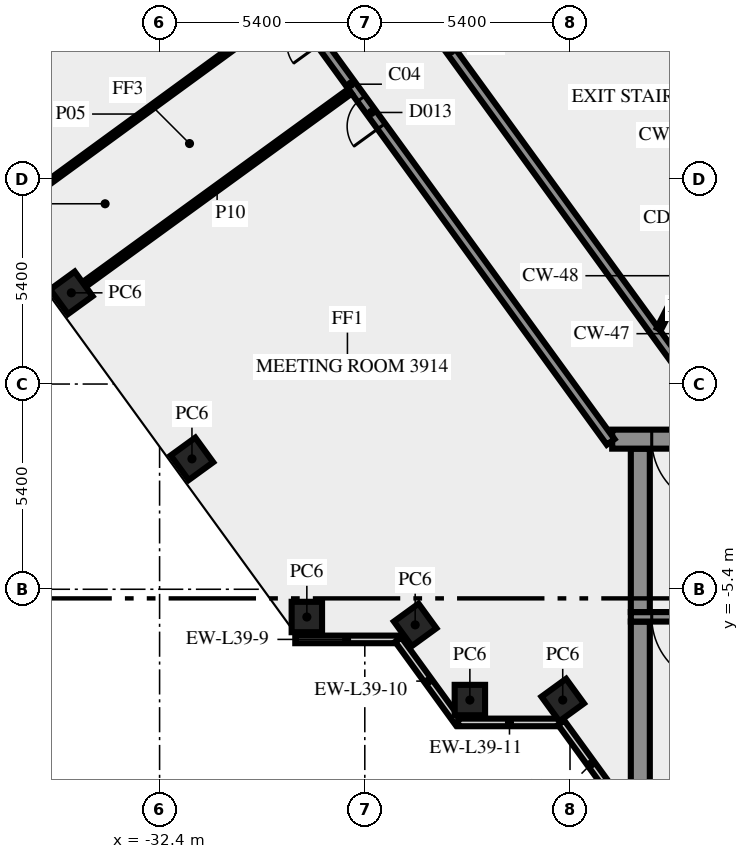
"""IFC4 building model, lengths in metres.
Left out: names, types, materials, properties, quantities, classifications, styles, units other than length and angle.
Written with IfcOpenShell. Run it as: python <this file> out.ifc"""

import sys

from ifc_helpers import new_model, si_unit, direction, frame, frame_2d, origin, origin_2d, place, context, subcontext, project, spatial, rectangle, extrude, element, fill, save


model = new_model("IFC4")
c1 = context("Model", 3, precision=1e-05, world=origin(), true_north=direction((0.0, 1.0)))
c2 = subcontext(c1, "Body", "Model", "MODEL_VIEW")
j1 = project(units=[si_unit("LENGTHUNIT", "METRE"), si_unit("PLANEANGLEUNIT", "RADIAN")], contexts=[c1])
p1 = place(None, origin())
s1 = spatial("IfcSite", under=j1, at=p1, CompositionType="ELEMENT")
p2 = place(p1, origin())
s2 = spatial("IfcBuilding", under=s1, at=p2, CompositionType="ELEMENT")
p3 = place(p2, frame((0.0, 0.0, 168.0)))
s3 = spatial("IfcBuildingStorey", under=s2, at=p3, CompositionType="ELEMENT", Elevation=168.0)
for number, where, z_axis, x_axis in (
    (1, (-34.722, 2.4, 0.0), (0.0, 0.0, 1.0), (0.588, -0.809, 0.0)),
    (2, (-31.548, -1.969, 0.0), (0.0, 0.0, 1.0), (0.588, -0.809, 0.0)),
    (3, (-28.525, -6.13, 0.0), (0.0, 0.0, 1.0), (1.0, 0.0, 0.0)),
    (4, (-25.674, -6.337, 0.0), (0.0, 0.0, 1.0), (0.588, -0.809, 0.0)),
    (5, (-24.235, -8.315, 0.0), (0.0, 0.0, 1.0), (1.0, 0.0, 0.0)),
    (6, (-21.792, -8.315, 0.0), (0.0, 0.0, 1.0), (0.588, -0.809, 0.0)),
):
    element("IfcColumn", number, at=place(p3, frame(where, z_axis=z_axis, x_axis=x_axis)), inside=s3, PredefinedType="COLUMN", context=c2, shape_type="SweptSolid", body=[
        extrude(rectangle(XDim=0.8, YDim=0.8, at=origin_2d()), origin(), (0.0, 0.0, 1.0), 3.65),
    ])
p4 = place(p3, frame((-28.83, -6.719, 0.0), z_axis=(0.0, 0.0, 1.0), x_axis=(1.0, 0.0, 0.0)))
e7 = element("IfcWall", 7, at=p4, inside=s3, PredefinedType="SOLIDWALL", context=c2, shape_type="SweptSolid", body=[
    extrude(rectangle(XDim=2.7, YDim=0.2, at=frame_2d((1.35, 0.0))), origin(), (0.0, 0.0, 1.0), 3.65),
])
p5 = place(p3, frame((-26.12, -6.724, 0.0), z_axis=(0.0, 0.0, 1.0), x_axis=(0.587720002413, -0.809064397168, 0.0)))
e8 = element("IfcWall", 8, at=p5, inside=s3, PredefinedType="SOLIDWALL", context=c2, shape_type="SweptSolid", body=[
    extrude(rectangle(XDim=2.7, YDim=0.2, at=frame_2d((1.35, 0.0))), origin(), (0.0, 0.0, 1.0), 3.65),
])
p6 = place(p3, frame((-24.543, -8.904, 0.0), z_axis=(0.0, 0.0, 1.0), x_axis=(1.0, 0.0, 0.0)))
e9 = element("IfcWall", 9, at=p6, inside=s3, PredefinedType="SOLIDWALL", context=c2, shape_type="SweptSolid", body=[
    extrude(rectangle(XDim=2.7, YDim=0.2, at=frame_2d((1.35, 0.0))), origin(), (0.0, 0.0, 1.0), 3.65),
])
p7 = place(p3, frame((-21.833, -8.909, 0.0), z_axis=(0.0, 0.0, 1.0), x_axis=(0.587766567315, -0.809030569476, 0.0)))
e10 = element("IfcWall", 10, at=p7, inside=s3, PredefinedType="SOLIDWALL", context=c2, shape_type="SweptSolid", body=[
    extrude(rectangle(XDim=2.688, YDim=0.2, at=frame_2d((1.344, 0.0))), origin(), (0.0, 0.0, 1.0), 3.65),
])
p8 = place(p3, frame((-19.75, -10.5, 0.0), z_axis=(0.0, 0.0, 1.0), x_axis=(0.0, 1.0, 0.0)))
e11 = element("IfcWall", 11, at=p8, inside=s3, PredefinedType="SHEAR", context=c2, shape_type="SweptSolid", body=[
    extrude(rectangle(XDim=4.25, YDim=0.5, at=frame_2d((2.125, 0.0))), origin(), (0.0, 0.0, 1.0), 3.65),
])
p9 = place(p3, frame((-9.8, -6.125, 0.0), z_axis=(0.0, 0.0, 1.0), x_axis=(-1.0, 0.0, 0.0)))
e12 = element("IfcWall", 12, at=p9, inside=s3, PredefinedType="SHEAR", context=c2, shape_type="SweptSolid", body=[
    extrude(rectangle(XDim=10.2, YDim=0.25, at=frame_2d((5.1, 0.0))), origin(), (0.0, 0.0, 1.0), 3.65),
])
p10 = place(p9, frame((7.85, 0.0, 0.0)))
e13 = element("IfcOpeningElement", 13, at=p10, cuts=e12, PredefinedType="OPENING", context=c2, shape_type="SweptSolid", body=[
    extrude(rectangle(XDim=1.8, YDim=2.1, at=frame_2d((0.9, 1.05))), frame((0.0, 0.135, 0.0), z_axis=(0.0, -1.0, 0.0), x_axis=(1.0, 0.0, 0.0)), (0.0, 0.0, 1.0), 0.27),
])
p11 = place(p3, frame((-19.75, -6.0, 0.0), z_axis=(0.0, 0.0, 1.0), x_axis=(0.0, 1.0, 0.0)))
e14 = element("IfcWall", 14, at=p11, inside=s3, PredefinedType="SHEAR", context=c2, shape_type="SweptSolid", body=[
    extrude(rectangle(XDim=4.3, YDim=0.5, at=frame_2d((2.15, 0.0))), origin(), (0.0, 0.0, 1.0), 3.65),
])
p12 = place(p3, frame((20.49, -1.45, 0.0), z_axis=(0.0, 0.0, 1.0), x_axis=(-1.0, 0.0, 0.0)))
e15 = element("IfcWall", 15, at=p12, inside=s3, PredefinedType="SHEAR", context=c2, shape_type="SweptSolid", body=[
    extrude(rectangle(XDim=40.98, YDim=0.5, at=frame_2d((20.49, 0.0))), origin(), (0.0, 0.0, 1.0), 3.65),
])
p13 = place(p12, frame((38.14, 0.0, 0.0)))
e16 = element("IfcOpeningElement", 16, at=p13, cuts=e15, PredefinedType="OPENING", context=c2, shape_type="SweptSolid", body=[
    extrude(rectangle(XDim=1.8, YDim=2.1, at=frame_2d((0.9, 1.05))), frame((0.0, 0.26, 0.0), z_axis=(0.0, -1.0, 0.0), x_axis=(1.0, 0.0, 0.0)), (0.0, 0.0, 1.0), 0.52),
])
p14 = place(p12, frame((36.728, 0.0, 0.0)))
e17 = element("IfcOpeningElement", 17, at=p14, cuts=e15, PredefinedType="OPENING", context=c2, shape_type="SweptSolid", body=[
    extrude(rectangle(XDim=0.8, YDim=2.1, at=frame_2d((0.4, 1.05))), frame((0.0, 0.26, 0.0), z_axis=(0.0, -1.0, 0.0), x_axis=(1.0, 0.0, 0.0)), (0.0, 0.0, 1.0), 0.52),
])
p15 = place(p12, frame((35.153, 0.0, 0.0)))
e18 = element("IfcOpeningElement", 18, at=p15, cuts=e15, PredefinedType="OPENING", context=c2, shape_type="SweptSolid", body=[
    extrude(rectangle(XDim=0.8, YDim=2.1, at=frame_2d((0.4, 1.05))), frame((0.0, 0.26, 0.0), z_axis=(0.0, -1.0, 0.0), x_axis=(1.0, 0.0, 0.0)), (0.0, 0.0, 1.0), 0.52),
])
p16 = place(p12, frame((32.94, 0.0, 0.0)))
e19 = element("IfcOpeningElement", 19, at=p16, cuts=e15, PredefinedType="OPENING", context=c2, shape_type="SweptSolid", body=[
    extrude(rectangle(XDim=0.9, YDim=2.1, at=frame_2d((0.45, 1.05))), frame((0.0, 0.26, 0.0), z_axis=(0.0, -1.0, 0.0), x_axis=(1.0, 0.0, 0.0)), (0.0, 0.0, 1.0), 0.52),
])
p17 = place(p12, frame((27.84, 0.0, 0.0)))
e20 = element("IfcOpeningElement", 20, at=p17, cuts=e15, PredefinedType="OPENING", context=c2, shape_type="SweptSolid", body=[
    extrude(rectangle(XDim=0.9, YDim=2.1, at=frame_2d((0.45, 1.05))), frame((0.0, 0.26, 0.0), z_axis=(0.0, -1.0, 0.0), x_axis=(1.0, 0.0, 0.0)), (0.0, 0.0, 1.0), 0.52),
])
p18 = place(p12, frame((21.765, 0.0, 0.0)))
e21 = element("IfcOpeningElement", 21, at=p18, cuts=e15, PredefinedType="OPENING", context=c2, shape_type="SweptSolid", body=[
    extrude(rectangle(XDim=2.0, YDim=2.1, at=frame_2d((1.0, 1.05))), frame((0.0, 0.26, 0.0), z_axis=(0.0, -1.0, 0.0), x_axis=(1.0, 0.0, 0.0)), (0.0, 0.0, 1.0), 0.52),
])
p19 = place(p12, frame((7.14, 0.0, 0.0)))
e22 = element("IfcOpeningElement", 22, at=p19, cuts=e15, PredefinedType="OPENING", context=c2, shape_type="SweptSolid", body=[
    extrude(rectangle(XDim=0.9, YDim=2.1, at=frame_2d((0.45, 1.05))), frame((0.0, 0.26, 0.0), z_axis=(0.0, -1.0, 0.0), x_axis=(1.0, 0.0, 0.0)), (0.0, 0.0, 1.0), 0.52),
])
p20 = place(p12, frame((4.19, 0.0, 0.0)))
e23 = element("IfcOpeningElement", 23, at=p20, cuts=e15, PredefinedType="OPENING", context=c2, shape_type="SweptSolid", body=[
    extrude(rectangle(XDim=0.9, YDim=2.1, at=frame_2d((0.45, 1.05))), frame((0.0, 0.26, 0.0), z_axis=(0.0, -1.0, 0.0), x_axis=(1.0, 0.0, 0.0)), (0.0, 0.0, 1.0), 0.52),
])
p21 = place(p12, frame((1.04, 0.0, 0.0)))
e24 = element("IfcOpeningElement", 24, at=p21, cuts=e15, PredefinedType="OPENING", context=c2, shape_type="SweptSolid", body=[
    extrude(rectangle(XDim=1.8, YDim=2.1, at=frame_2d((0.9, 1.05))), frame((0.0, 0.26, 0.0), z_axis=(0.0, -1.0, 0.0), x_axis=(1.0, 0.0, 0.0)), (0.0, 0.0, 1.0), 0.52),
])
p22 = place(p3, frame((-20.531, -1.523, 0.0), z_axis=(0.0, 0.0, 1.0), x_axis=(-0.587784239999, 0.809017729849, 0.0)))
e25 = element("IfcWall", 25, at=p22, inside=s3, PredefinedType="SOLIDWALL", context=c2, shape_type="SweptSolid", body=[
    extrude(rectangle(XDim=23.271, YDim=0.25, at=frame_2d((11.635, 0.0))), origin(), (0.0, 0.0, 1.0), 3.65),
])
p23 = place(p22, frame((18.366, 0.0, 0.0)))
e26 = element("IfcOpeningElement", 26, at=p23, cuts=e25, PredefinedType="OPENING", context=c2, shape_type="SweptSolid", body=[
    extrude(rectangle(XDim=0.9, YDim=2.1, at=frame_2d((0.45, 1.05))), frame((0.0, 0.135, 0.0), z_axis=(0.0, -1.0, 0.0), x_axis=(1.0, 0.0, 0.0)), (0.0, 0.0, 1.0), 0.27),
])
p24 = place(p22, frame((10.266, 0.0, 0.0)))
e27 = element("IfcOpeningElement", 27, at=p24, cuts=e25, PredefinedType="OPENING", context=c2, shape_type="SweptSolid", body=[
    extrude(rectangle(XDim=0.9, YDim=2.1, at=frame_2d((0.45, 1.05))), frame((0.0, 0.135, 0.0), z_axis=(0.0, -1.0, 0.0), x_axis=(1.0, 0.0, 0.0)), (0.0, 0.0, 1.0), 0.27),
])
p25 = place(p22, frame((21.896, 0.0, 0.0)))
e28 = element("IfcOpeningElement", 28, at=p25, cuts=e25, PredefinedType="OPENING", context=c2, shape_type="SweptSolid", body=[
    extrude(rectangle(XDim=0.9, YDim=2.1, at=frame_2d((0.45, 1.05))), frame((0.0, 0.135, 0.0), z_axis=(0.0, -1.0, 0.0), x_axis=(1.0, 0.0, 0.0)), (0.0, 0.0, 1.0), 0.27),
])
p26 = place(p22, frame((12.966, 0.0, 0.0)))
e29 = element("IfcOpeningElement", 29, at=p26, cuts=e25, PredefinedType="OPENING", context=c2, shape_type="SweptSolid", body=[
    extrude(rectangle(XDim=0.9, YDim=2.1, at=frame_2d((0.45, 1.05))), frame((0.0, 0.135, 0.0), z_axis=(0.0, -1.0, 0.0), x_axis=(1.0, 0.0, 0.0)), (0.0, 0.0, 1.0), 0.27),
])
p27 = place(p3, frame((-31.918, 18.658, 0.0), z_axis=(0.0, 0.0, 1.0), x_axis=(0.587788731405, -0.80901446664, 0.0)))
e30 = element("IfcWall", 30, at=p27, inside=s3, PredefinedType="SOLIDWALL", context=c2, shape_type="SweptSolid", body=[
    extrude(rectangle(XDim=24.453, YDim=0.25, at=frame_2d((12.227, 0.0))), origin(), (0.0, 0.0, 1.0), 3.65),
])
p28 = place(p27, frame((0.224, 0.0, 0.0)))
e31 = element("IfcOpeningElement", 31, at=p28, cuts=e30, PredefinedType="OPENING", context=c2, shape_type="SweptSolid", body=[
    extrude(rectangle(XDim=0.9, YDim=2.1, at=frame_2d((0.45, 1.05))), frame((0.0, 0.135, 0.0), z_axis=(0.0, -1.0, 0.0), x_axis=(1.0, 0.0, 0.0)), (0.0, 0.0, 1.0), 0.27),
])
p29 = place(p3, frame((-32.15, 14.256, 0.0), z_axis=(0.0, 0.0, 1.0), x_axis=(-0.809064299351, -0.587720137068, 0.0)))
e32 = element("IfcWall", 32, at=p29, inside=s3, PredefinedType="SOLIDWALL", context=c2, shape_type="SweptSolid", body=[
    extrude(rectangle(XDim=9.55, YDim=0.2, at=frame_2d((4.775, 0.0))), origin(), (0.0, 0.0, 1.0), 2.85),
])
p30 = place(p3, frame((-36.712, 4.288, 0.0), z_axis=(0.0, 0.0, 1.0), x_axis=(0.807606997933, 0.589721067023, 0.0)))
e33 = element("IfcWall", 33, at=p30, inside=s3, PredefinedType="PARTITIONING", context=c2, shape_type="SweptSolid", body=[
    extrude(rectangle(XDim=9.55, YDim=0.12, at=frame_2d((4.775, 0.0))), origin(), (0.0, 0.0, 1.0), 2.85),
])
p31 = place(p3, frame((-27.389, 7.703, 0.0), z_axis=(0.0, 0.0, 1.0), x_axis=(-0.809060825193, -0.587724919617, 0.0)))
e34 = element("IfcWall", 34, at=p31, inside=s3, PredefinedType="PARTITIONING", context=c2, shape_type="SweptSolid", body=[
    extrude(rectangle(XDim=8.645, YDim=0.15, at=frame_2d((4.322, 0.0))), origin(), (0.0, 0.0, 1.0), 3.65),
])
p32 = place(p3, frame((-19.261, 1.45, 0.0), z_axis=(0.0, 0.0, 1.0), x_axis=(0.453950796792, 0.891026752736, 0.0)))
e35 = element("IfcWall", 35, at=p32, inside=s3, PredefinedType="PARTITIONING", context=c2, shape_type="SweptSolid", body=[
    extrude(rectangle(XDim=2.778, YDim=0.12, at=frame_2d((1.389, 0.0))), origin(), (0.0, 0.0, 1.0), 3.65),
])
p33 = place(p10, origin())
e36 = element("IfcDoor", 36, at=p33, inside=s3, OperationType="DOUBLE_DOOR_SINGLE_SWING", PredefinedType="DOOR", context=c2, shape_type="SweptSolid", body=[
    extrude(rectangle(XDim=1.8, YDim=2.1, at=frame_2d((0.9, 1.05))), frame((0.0, 0.025, 0.0), z_axis=(0.0, -1.0, 0.0), x_axis=(1.0, 0.0, 0.0)), (0.0, 0.0, 1.0), 0.05),
])
fill(e13, e36)
p34 = place(p13, origin())
e37 = element("IfcDoor", 37, at=p34, inside=s3, OperationType="DOUBLE_DOOR_SINGLE_SWING", PredefinedType="DOOR", context=c2, shape_type="SweptSolid", body=[
    extrude(rectangle(XDim=1.8, YDim=2.1, at=frame_2d((0.9, 1.05))), frame((0.0, 0.025, 0.0), z_axis=(0.0, -1.0, 0.0), x_axis=(1.0, 0.0, 0.0)), (0.0, 0.0, 1.0), 0.05),
])
fill(e16, e37)
p35 = place(p24, origin())
e38 = element("IfcDoor", 38, at=p35, inside=s3, OperationType="SINGLE_SWING_RIGHT", PredefinedType="DOOR", context=c2, shape_type="SweptSolid", body=[
    extrude(rectangle(XDim=0.9, YDim=2.1, at=frame_2d((0.45, 1.05))), frame((0.0, 0.025, 0.0), z_axis=(0.0, -1.0, 0.0), x_axis=(1.0, 0.0, 0.0)), (0.0, 0.0, 1.0), 0.05),
])
fill(e27, e38)
save(model, sys.argv[1])
